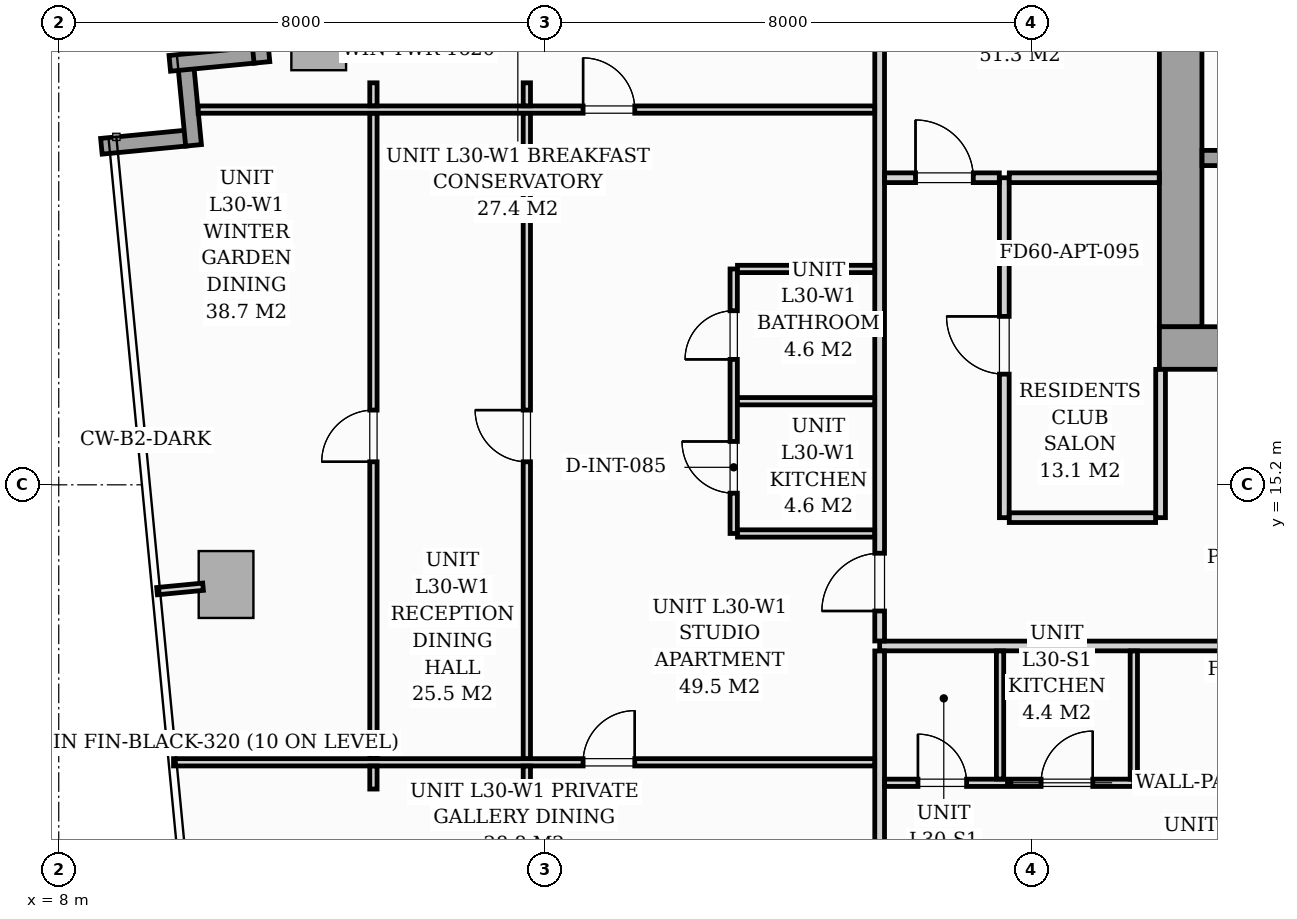
"""IFC4 building model, lengths in metres.
Left out: names, types, materials, properties, quantities, classifications, styles, units other than length and angle.
Written with IfcOpenShell. Run it as: python <this file> out.ifc"""

import sys

from ifc_helpers import new_model, si_unit, direction, frame, frame_2d, origin, origin_2d, place, context, subcontext, project, spatial, rectangle, i_section, extrude, source, transform, mapped, element, fill, save


model = new_model("IFC4")
c1 = context("Model", 3, precision=1e-05, world=origin(), true_north=direction((0.0, 1.0)))
c2 = subcontext(c1, "Body", "Model", "MODEL_VIEW")
j1 = project(units=[si_unit("LENGTHUNIT", "METRE"), si_unit("PLANEANGLEUNIT", "RADIAN")], contexts=[c1])
p1 = place(None, origin())
s1 = spatial("IfcSite", under=j1, at=p1, CompositionType="ELEMENT")
p2 = place(p1, origin())
s2 = spatial("IfcBuilding", under=s1, at=p2, CompositionType="ELEMENT")
p3 = place(p2, frame((0.0, 0.0, 106.6)))
s3 = spatial("IfcBuildingStorey", under=s2, at=p3, CompositionType="ELEMENT", Elevation=106.6)
m1 = source(origin(), c2, "Body", "SweptSolid", [
    extrude(i_section(OverallWidth=0.427, OverallDepth=0.483, WebThickness=0.051, FlangeThickness=0.082, FilletRadius=0.018, at=origin_2d()), origin(), (0.0, 0.0, 1.0), 3.196),
])
p4 = place(p3, frame((26.4, 17.4, 0.002), z_axis=(0.0, 0.0, 1.0), x_axis=(1.0, 0.0, 0.0)))
e1 = element("IfcColumn", 1, at=p4, inside=s3, PredefinedType="PILASTER", context=c2, shape_type="MappedRepresentation", body=[
    mapped(m1, transform((0.0, 0.0, 0.0), scale=1.0)),
])
m2 = source(origin(), c2, "Body", "SweptSolid", [
    extrude(rectangle(XDim=0.9, YDim=1.1, at=origin_2d()), origin(), (0.0, 0.0, 1.0), 3.196),
])
for number, where, z_axis, x_axis in (
    (2, (12.275, 22.568, 0.002), (0.0, 0.0, 1.0), (0.995, 0.096, 0.0)),
    (3, (10.752, 13.561, 0.002), (0.0, 0.0, 1.0), (0.995, 0.096, 0.0)),
):
    element("IfcColumn", number, at=place(p3, frame(where, z_axis=z_axis, x_axis=x_axis)), inside=s3, PredefinedType="COLUMN", context=c2, shape_type="MappedRepresentation", body=[
        mapped(m2, transform((0.0, 0.0, 0.0), scale=1.0)),
    ])
for number, where, z_axis, x_axis in (
    (4, (8.701, 20.767, 0.0), (0.0, 0.0, 1.0), (0.995, 0.096, 0.0)),
    (5, (10.217, 20.783, 0.0), (0.0, 0.0, 1.0), (-0.096, 0.995, 0.0)),
):
    element("IfcWall", number, at=place(p3, frame(where, z_axis=z_axis, x_axis=x_axis)), inside=s3, PredefinedType="STANDARD", context=c2, shape_type="SweptSolid", body=[
        extrude(rectangle(XDim=1.395, YDim=0.26, at=frame_2d((0.698, 0.0))), origin(), (0.0, 0.0, 1.0), 2.94),
    ])
p5 = place(p3, frame((9.826, 22.131, 0.0), z_axis=(0.0, 0.0, 1.0), x_axis=(0.995389446633, 0.095915846097, 0.0)))
e6 = element("IfcWall", 6, at=p5, inside=s3, PredefinedType="STANDARD", context=c2, shape_type="SweptSolid", body=[
    extrude(rectangle(XDim=1.395, YDim=0.26, at=frame_2d((0.697, 0.0))), origin(), (0.0, 0.0, 1.0), 2.94),
])
p6 = place(p3, frame((11.341, 22.147, 0.0), z_axis=(0.0, 0.0, 1.0), x_axis=(-0.09589913835, 0.995391056452, 0.0)))
e7 = element("IfcWall", 7, at=p6, inside=s3, PredefinedType="STANDARD", context=c2, shape_type="SweptSolid", body=[
    extrude(rectangle(XDim=1.395, YDim=0.26, at=frame_2d((0.698, 0.0))), origin(), (0.0, 0.0, 1.0), 2.94),
])
p7 = place(p3, frame((26.1, 17.45, 0.0), z_axis=(0.0, 0.0, 1.0), x_axis=(1.0, 0.0, 0.0)))
e8 = element("IfcWall", 8, at=p7, inside=s3, PredefinedType="SHEAR", context=c2, shape_type="SweptSolid", body=[
    extrude(rectangle(XDim=19.8, YDim=0.7, at=frame_2d((9.9, 0.0))), origin(), (0.0, 0.0, 1.0), 3.2),
])
p8 = place(p7, frame((1.05, 0.0, 0.0)))
e9 = element("IfcOpeningElement", 9, at=p8, cuts=e8, PredefinedType="OPENING", context=c2, shape_type="SweptSolid", body=[
    extrude(rectangle(XDim=0.95, YDim=2.06, at=frame_2d((0.475, 1.03))), frame((0.0, 0.36, 0.0), z_axis=(0.0, -1.0, 0.0), x_axis=(1.0, 0.0, 0.0)), (0.0, 0.0, 1.0), 0.72),
])
p9 = place(p7, frame((9.48, 0.0, 0.0)))
e10 = element("IfcOpeningElement", 10, at=p9, cuts=e8, PredefinedType="OPENING", context=c2, shape_type="SweptSolid", body=[
    extrude(rectangle(XDim=0.85, YDim=2.0, at=frame_2d((0.425, 1.0))), frame((0.0, 0.36, 0.0), z_axis=(0.0, -1.0, 0.0), x_axis=(1.0, 0.0, 0.0)), (0.0, 0.0, 1.0), 0.72),
])
p10 = place(p7, frame((17.65, 0.0, 0.0)))
e11 = element("IfcOpeningElement", 11, at=p10, cuts=e8, PredefinedType="OPENING", context=c2, shape_type="SweptSolid", body=[
    extrude(rectangle(XDim=0.95, YDim=2.06, at=frame_2d((0.475, 1.03))), frame((0.0, 0.36, 0.0), z_axis=(0.0, -1.0, 0.0), x_axis=(1.0, 0.0, 0.0)), (0.0, 0.0, 1.0), 0.72),
])
p11 = place(p3, frame((26.45, 17.802, 0.0), z_axis=(0.0, 0.0, 1.0), x_axis=(0.0, 1.0, 0.0)))
e12 = element("IfcWall", 12, at=p11, inside=s3, PredefinedType="SHEAR", context=c2, shape_type="SweptSolid", body=[
    extrude(rectangle(XDim=5.796, YDim=0.7, at=frame_2d((2.898, 0.0))), origin(), (0.0, 0.0, 1.0), 3.2),
])
p12 = place(p3, frame((26.802, 20.575, 0.0), z_axis=(0.0, 0.0, 1.0), x_axis=(1.0, 0.0, 0.0)))
e13 = element("IfcWall", 13, at=p12, inside=s3, PredefinedType="SOLIDWALL", context=c2, shape_type="SweptSolid", body=[
    extrude(rectangle(XDim=8.148, YDim=0.25, at=frame_2d((4.074, 0.0))), origin(), (0.0, 0.0, 1.0), 3.2),
])
p13 = place(p12, frame((0.348, 0.0, 0.0)))
e14 = element("IfcOpeningElement", 14, at=p13, cuts=e13, PredefinedType="OPENING", context=c2, shape_type="SweptSolid", body=[
    extrude(rectangle(XDim=0.95, YDim=2.06, at=frame_2d((0.475, 1.03))), frame((0.0, 0.135, 0.0), z_axis=(0.0, -1.0, 0.0), x_axis=(1.0, 0.0, 0.0)), (0.0, 0.0, 1.0), 0.27),
])
p14 = place(p3, frame((21.5, 12.55, 0.0), z_axis=(0.0, 0.0, 1.0), x_axis=(1.0, 0.0, 0.0)))
e15 = element("IfcWall", 15, at=p14, inside=s3, PredefinedType="PARTITIONING", context=c2, shape_type="SweptSolid", body=[
    extrude(rectangle(XDim=24.38, YDim=0.16, at=frame_2d((12.19, 0.0))), origin(), (0.0, 0.0, 1.0), 2.94),
])
p15 = place(p14, frame((6.075, 0.0, 0.0)))
e16 = element("IfcOpeningElement", 16, at=p15, cuts=e15, PredefinedType="OPENING", context=c2, shape_type="SweptSolid", body=[
    extrude(rectangle(XDim=0.95, YDim=2.06, at=frame_2d((0.475, 1.03))), frame((0.0, 0.09, 0.0), z_axis=(0.0, -1.0, 0.0), x_axis=(1.0, 0.0, 0.0)), (0.0, 0.0, 1.0), 0.18),
])
p16 = place(p14, frame((10.519, 0.0, 0.0)))
e17 = element("IfcOpeningElement", 17, at=p16, cuts=e15, PredefinedType="OPENING", context=c2, shape_type="SweptSolid", body=[
    extrude(rectangle(XDim=0.95, YDim=2.06, at=frame_2d((0.475, 1.03))), frame((0.0, 0.09, 0.0), z_axis=(0.0, -1.0, 0.0), x_axis=(1.0, 0.0, 0.0)), (0.0, 0.0, 1.0), 0.18),
])
p17 = place(p14, frame((18.208, 0.0, 0.0)))
e18 = element("IfcOpeningElement", 18, at=p17, cuts=e15, PredefinedType="OPENING", context=c2, shape_type="SweptSolid", body=[
    extrude(rectangle(XDim=0.95, YDim=2.06, at=frame_2d((0.475, 1.03))), frame((0.0, 0.09, 0.0), z_axis=(0.0, -1.0, 0.0), x_axis=(1.0, 0.0, 0.0)), (0.0, 0.0, 1.0), 0.18),
])
p18 = place(p3, frame((21.5, 4.812, 0.0), z_axis=(0.0, 0.0, 1.0), x_axis=(0.0, 1.0, 0.0)))
e19 = element("IfcWall", 19, at=p18, inside=s3, PredefinedType="PARTITIONING", context=c2, shape_type="SweptSolid", body=[
    extrude(rectangle(XDim=7.656, YDim=0.16, at=frame_2d((3.828, 0.0))), origin(), (0.0, 0.0, 1.0), 2.94),
])
p19 = place(p3, frame((21.5, 12.632, 0.0), z_axis=(0.0, 0.0, 1.0), x_axis=(0.0, 1.0, 0.0)))
e20 = element("IfcWall", 20, at=p19, inside=s3, PredefinedType="PARTITIONING", context=c2, shape_type="SweptSolid", body=[
    extrude(rectangle(XDim=11.747, YDim=0.16, at=frame_2d((5.873, 0.0))), origin(), (0.0, 0.0, 1.0), 2.94),
])
p20 = place(p19, frame((0.493, 0.0, 0.0)))
e21 = element("IfcOpeningElement", 21, at=p20, cuts=e20, PredefinedType="OPENING", context=c2, shape_type="SweptSolid", body=[
    extrude(rectangle(XDim=0.95, YDim=2.06, at=frame_2d((0.475, 1.03))), frame((0.0, 0.09, 0.0), z_axis=(0.0, -1.0, 0.0), x_axis=(1.0, 0.0, 0.0)), (0.0, 0.0, 1.0), 0.18),
])
p21 = place(p3, frame((21.582, 10.3, 0.0), z_axis=(0.0, 0.0, 1.0), x_axis=(1.0, 0.0, 0.0)))
e22 = element("IfcWall", 22, at=p21, inside=s3, PredefinedType="PARTITIONING", context=c2, shape_type="SweptSolid", body=[
    extrude(rectangle(XDim=4.098, YDim=0.12, at=frame_2d((2.049, 0.0))), origin(), (0.0, 0.0, 1.0), 2.94),
])
p22 = place(p21, frame((0.548, 0.0, 0.0)))
e23 = element("IfcOpeningElement", 23, at=p22, cuts=e22, PredefinedType="OPENING", context=c2, shape_type="SweptSolid", body=[
    extrude(rectangle(XDim=0.8, YDim=2.02, at=frame_2d((0.4, 1.01))), frame((0.0, 0.07, 0.0), z_axis=(0.0, -1.0, 0.0), x_axis=(1.0, 0.0, 0.0)), (0.0, 0.0, 1.0), 0.14),
])
p23 = place(p21, frame((2.573, 0.0, 0.0)))
e24 = element("IfcOpeningElement", 24, at=p23, cuts=e22, PredefinedType="OPENING", context=c2, shape_type="SweptSolid", body=[
    extrude(rectangle(XDim=0.85, YDim=2.05, at=frame_2d((0.425, 1.025))), frame((0.0, 0.07, 0.0), z_axis=(0.0, -1.0, 0.0), x_axis=(1.0, 0.0, 0.0)), (0.0, 0.0, 1.0), 0.14),
])
for number, where, z_axis, x_axis in (
    (25, (25.68, 10.362, 0.0), (0.0, 0.0, 1.0), (0.0, 1.0, 0.0)),
    (26, (23.48, 10.362, 0.0), (0.0, 0.0, 1.0), (0.0, 1.0, 0.0)),
):
    element("IfcWall", number, at=place(p3, frame(where, z_axis=z_axis, x_axis=x_axis)), inside=s3, PredefinedType="PARTITIONING", context=c2, shape_type="SweptSolid", body=[
        extrude(rectangle(XDim=2.106, YDim=0.12, at=frame_2d((1.053, 0.0))), origin(), (0.0, 0.0, 1.0), 2.94),
    ])
p24 = place(p3, frame((19.1, 14.4, 0.0), z_axis=(0.0, 0.0, 1.0), x_axis=(0.0, 1.0, 0.0)))
e27 = element("IfcWall", 27, at=p24, inside=s3, PredefinedType="PARTITIONING", context=c2, shape_type="SweptSolid", body=[
    extrude(rectangle(XDim=4.35, YDim=0.12, at=frame_2d((2.175, 0.0))), origin(), (0.0, 0.0, 1.0), 2.94),
])
p25 = place(p24, frame((0.663, 0.0, 0.0)))
e28 = element("IfcOpeningElement", 28, at=p25, cuts=e27, PredefinedType="OPENING", context=c2, shape_type="SweptSolid", body=[
    extrude(rectangle(XDim=0.85, YDim=2.05, at=frame_2d((0.425, 1.025))), frame((0.0, 0.07, 0.0), z_axis=(0.0, -1.0, 0.0), x_axis=(1.0, 0.0, 0.0)), (0.0, 0.0, 1.0), 0.14),
])
p26 = place(p24, frame((2.863, 0.0, 0.0)))
e29 = element("IfcOpeningElement", 29, at=p26, cuts=e27, PredefinedType="OPENING", context=c2, shape_type="SweptSolid", body=[
    extrude(rectangle(XDim=0.8, YDim=2.02, at=frame_2d((0.4, 1.01))), frame((0.0, 0.07, 0.0), z_axis=(0.0, -1.0, 0.0), x_axis=(1.0, 0.0, 0.0)), (0.0, 0.0, 1.0), 0.14),
])
for number, where, z_axis, x_axis in (
    (30, (19.162, 16.575, 0.0), (0.0, 0.0, 1.0), (1.0, 0.0, 0.0)),
    (31, (19.162, 14.4, 0.0), (0.0, 0.0, 1.0), (1.0, 0.0, 0.0)),
    (32, (19.162, 18.75, 0.0), (0.0, 0.0, 1.0), (1.0, 0.0, 0.0)),
):
    element("IfcWall", number, at=place(p3, frame(where, z_axis=z_axis, x_axis=x_axis)), inside=s3, PredefinedType="PARTITIONING", context=c2, shape_type="SweptSolid", body=[
        extrude(rectangle(XDim=2.256, YDim=0.12, at=frame_2d((1.128, 0.0))), origin(), (0.0, 0.0, 1.0), 2.94),
    ])
p27 = place(p3, frame((10.293, 21.371, 0.0), z_axis=(0.0, 0.0, 1.0), x_axis=(1.0, 0.0, 0.0)))
e33 = element("IfcWall", 33, at=p27, inside=s3, PredefinedType="PARTITIONING", context=c2, shape_type="SweptSolid", body=[
    extrude(rectangle(XDim=11.125, YDim=0.12, at=frame_2d((5.562, 0.0))), origin(), (0.0, 0.0, 1.0), 2.94),
])
p28 = place(p27, frame((6.33, 0.0, 0.0)))
e34 = element("IfcOpeningElement", 34, at=p28, cuts=e33, PredefinedType="OPENING", context=c2, shape_type="SweptSolid", body=[
    extrude(rectangle(XDim=0.85, YDim=2.05, at=frame_2d((0.425, 1.025))), frame((0.0, 0.07, 0.0), z_axis=(0.0, -1.0, 0.0), x_axis=(1.0, 0.0, 0.0)), (0.0, 0.0, 1.0), 0.14),
])
p29 = place(p3, frame((9.888, 10.637, 0.0), z_axis=(0.0, 0.0, 1.0), x_axis=(1.0, 0.0, 0.0)))
e35 = element("IfcWall", 35, at=p29, inside=s3, PredefinedType="PARTITIONING", context=c2, shape_type="SweptSolid", body=[
    extrude(rectangle(XDim=11.53, YDim=0.12, at=frame_2d((5.765, 0.0))), origin(), (0.0, 0.0, 1.0), 2.94),
])
p30 = place(p29, frame((6.735, 0.0, 0.0)))
e36 = element("IfcOpeningElement", 36, at=p30, cuts=e35, PredefinedType="OPENING", context=c2, shape_type="SweptSolid", body=[
    extrude(rectangle(XDim=0.85, YDim=2.05, at=frame_2d((0.425, 1.025))), frame((0.0, 0.07, 0.0), z_axis=(0.0, -1.0, 0.0), x_axis=(1.0, 0.0, 0.0)), (0.0, 0.0, 1.0), 0.14),
])
p31 = place(p3, frame((13.175, 10.197, 0.0), z_axis=(0.0, 0.0, 1.0), x_axis=(0.0, 1.0, 0.0)))
e37 = element("IfcWall", 37, at=p31, inside=s3, PredefinedType="PARTITIONING", context=c2, shape_type="SweptSolid", body=[
    extrude(rectangle(XDim=0.378, YDim=0.12, at=frame_2d((0.189, 0.0))), origin(), (0.0, 0.0, 1.0), 2.94),
])
p32 = place(p3, frame((13.175, 10.699, 0.0), z_axis=(0.0, 0.0, 1.0), x_axis=(0.0, 1.0, 0.0)))
e38 = element("IfcWall", 38, at=p32, inside=s3, PredefinedType="PARTITIONING", context=c2, shape_type="SweptSolid", body=[
    extrude(rectangle(XDim=10.61, YDim=0.12, at=frame_2d((5.305, 0.0))), origin(), (0.0, 0.0, 1.0), 2.94),
])
p33 = place(p32, frame((4.88, 0.0, 0.0)))
e39 = element("IfcOpeningElement", 39, at=p33, cuts=e38, PredefinedType="OPENING", context=c2, shape_type="SweptSolid", body=[
    extrude(rectangle(XDim=0.85, YDim=2.05, at=frame_2d((0.425, 1.025))), frame((0.0, 0.07, 0.0), z_axis=(0.0, -1.0, 0.0), x_axis=(1.0, 0.0, 0.0)), (0.0, 0.0, 1.0), 0.14),
])
for number, where, z_axis, x_axis in (
    (40, (13.175, 21.433, 0.0), (0.0, 0.0, 1.0), (0.0, 1.0, 0.0)),
    (41, (15.698, 10.197, 0.0), (0.0, 0.0, 1.0), (0.0, 1.0, 0.0)),
):
    element("IfcWall", number, at=place(p3, frame(where, z_axis=z_axis, x_axis=x_axis)), inside=s3, PredefinedType="PARTITIONING", context=c2, shape_type="SweptSolid", body=[
        extrude(rectangle(XDim=0.378, YDim=0.12, at=frame_2d((0.189, 0.0))), origin(), (0.0, 0.0, 1.0), 2.94),
    ])
p34 = place(p3, frame((15.698, 10.699, 0.0), z_axis=(0.0, 0.0, 1.0), x_axis=(0.0, 1.0, 0.0)))
e42 = element("IfcWall", 42, at=p34, inside=s3, PredefinedType="PARTITIONING", context=c2, shape_type="SweptSolid", body=[
    extrude(rectangle(XDim=10.61, YDim=0.12, at=frame_2d((5.305, 0.0))), origin(), (0.0, 0.0, 1.0), 2.94),
])
p35 = place(p34, frame((4.88, 0.0, 0.0)))
e43 = element("IfcOpeningElement", 43, at=p35, cuts=e42, PredefinedType="OPENING", context=c2, shape_type="SweptSolid", body=[
    extrude(rectangle(XDim=0.85, YDim=2.05, at=frame_2d((0.425, 1.025))), frame((0.0, 0.07, 0.0), z_axis=(0.0, -1.0, 0.0), x_axis=(1.0, 0.0, 0.0)), (0.0, 0.0, 1.0), 0.14),
])
p36 = place(p3, frame((15.698, 21.433, 0.0), z_axis=(0.0, 0.0, 1.0), x_axis=(0.0, 1.0, 0.0)))
e44 = element("IfcWall", 44, at=p36, inside=s3, PredefinedType="PARTITIONING", context=c2, shape_type="SweptSolid", body=[
    extrude(rectangle(XDim=0.378, YDim=0.12, at=frame_2d((0.189, 0.0))), origin(), (0.0, 0.0, 1.0), 2.94),
])
p37 = place(p3, frame((23.55, 14.66, 0.0), z_axis=(0.0, 0.0, 1.0), x_axis=(0.0, 1.0, 0.0)))
e45 = element("IfcWall", 45, at=p37, inside=s3, PredefinedType="PARTITIONING", context=c2, shape_type="SweptSolid", body=[
    extrude(rectangle(XDim=5.59, YDim=0.16, at=frame_2d((2.795, 0.0))), origin(), (0.0, 0.0, 1.0), 2.94),
])
p38 = place(p37, frame((2.36, 0.0, 0.0)))
e46 = element("IfcOpeningElement", 46, at=p38, cuts=e45, PredefinedType="OPENING", context=c2, shape_type="SweptSolid", body=[
    extrude(rectangle(XDim=0.95, YDim=2.06, at=frame_2d((0.475, 1.03))), frame((0.0, 0.09, 0.0), z_axis=(0.0, -1.0, 0.0), x_axis=(1.0, 0.0, 0.0)), (0.0, 0.0, 1.0), 0.18),
])
p39 = place(p3, frame((21.582, 20.25, 0.0), z_axis=(0.0, 0.0, 1.0), x_axis=(1.0, 0.0, 0.0)))
e47 = element("IfcWall", 47, at=p39, inside=s3, PredefinedType="PARTITIONING", context=c2, shape_type="SweptSolid", body=[
    extrude(rectangle(XDim=1.886, YDim=0.16, at=frame_2d((0.943, 0.0))), origin(), (0.0, 0.0, 1.0), 2.94),
])
p40 = place(p39, frame((0.508, 0.0, 0.0)))
e48 = element("IfcOpeningElement", 48, at=p40, cuts=e47, PredefinedType="OPENING", context=c2, shape_type="SweptSolid", body=[
    extrude(rectangle(XDim=0.95, YDim=2.06, at=frame_2d((0.475, 1.03))), frame((0.0, 0.09, 0.0), z_axis=(0.0, -1.0, 0.0), x_axis=(1.0, 0.0, 0.0)), (0.0, 0.0, 1.0), 0.18),
])
p41 = place(p3, frame((23.632, 20.25, 0.0), z_axis=(0.0, 0.0, 1.0), x_axis=(1.0, 0.0, 0.0)))
e49 = element("IfcWall", 49, at=p41, inside=s3, PredefinedType="PARTITIONING", context=c2, shape_type="SweptSolid", body=[
    extrude(rectangle(XDim=2.466, YDim=0.16, at=frame_2d((1.233, 0.0))), origin(), (0.0, 0.0, 1.0), 2.94),
])
p42 = place(p3, frame((26.12, 14.66, 0.0), z_axis=(0.0, 0.0, 1.0), x_axis=(0.0, 1.0, 0.0)))
e50 = element("IfcWall", 50, at=p42, inside=s3, PredefinedType="PARTITIONING", context=c2, shape_type="SweptSolid", body=[
    extrude(rectangle(XDim=2.438, YDim=0.16, at=frame_2d((1.219, 0.0))), origin(), (0.0, 0.0, 1.0), 2.94),
])
p43 = place(p3, frame((23.632, 14.66, 0.0), z_axis=(0.0, 0.0, 1.0), x_axis=(1.0, 0.0, 0.0)))
e51 = element("IfcWall", 51, at=p43, inside=s3, PredefinedType="PARTITIONING", context=c2, shape_type="SweptSolid", body=[
    extrude(rectangle(XDim=2.406, YDim=0.16, at=frame_2d((1.203, 0.0))), origin(), (0.0, 0.0, 1.0), 2.94),
])
p44 = place(p3, frame((10.373, 13.524, 0.0), z_axis=(0.0, 0.0, 1.0), x_axis=(-0.995377786728, -0.096036772582, 0.0)))
e52 = element("IfcWall", 52, at=p44, inside=s3, PredefinedType="PARTITIONING", context=c2, shape_type="SweptSolid", body=[
    extrude(rectangle(XDim=0.76, YDim=0.12, at=frame_2d((0.38, 0.0))), origin(), (0.0, 0.0, 1.0), 2.94),
])
m3 = source(origin(), c2, "Body", "SweptSolid", [
    extrude(rectangle(XDim=0.8, YDim=2.02, at=frame_2d((0.4, 1.01))), frame((0.0, 0.025, 0.0), z_axis=(0.0, -1.0, 0.0), x_axis=(1.0, 0.0, 0.0)), (0.0, 0.0, 1.0), 0.05),
])
p45 = place(p22, origin())
e53 = element("IfcDoor", 53, at=p45, inside=s3, OperationType="SINGLE_SWING_LEFT", PredefinedType="DOOR", context=c2, shape_type="MappedRepresentation", body=[
    mapped(m3, transform((0.0, 0.0, 0.0), scale=1.0)),
])
fill(e23, e53)
m4 = source(origin(), c2, "Body", "SweptSolid", [
    extrude(rectangle(XDim=0.85, YDim=2.05, at=frame_2d((0.425, 1.025))), frame((0.0, 0.025, 0.0), z_axis=(0.0, -1.0, 0.0), x_axis=(1.0, 0.0, 0.0)), (0.0, 0.0, 1.0), 0.05),
])
p46 = place(p23, origin())
e54 = element("IfcDoor", 54, at=p46, inside=s3, OperationType="SINGLE_SWING_RIGHT", PredefinedType="DOOR", context=c2, shape_type="MappedRepresentation", body=[
    mapped(m4, transform((0.0, 0.0, 0.0), scale=1.0)),
])
fill(e24, e54)
m5 = source(origin(), c2, "Body", "SweptSolid", [
    extrude(rectangle(XDim=0.95, YDim=2.06, at=frame_2d((0.475, 1.03))), frame((0.0, 0.025, 0.0), z_axis=(0.0, -1.0, 0.0), x_axis=(1.0, 0.0, 0.0)), (0.0, 0.0, 1.0), 0.05),
])
p47 = place(p20, origin())
e55 = element("IfcDoor", 55, at=p47, inside=s3, OperationType="SINGLE_SWING_LEFT", PredefinedType="DOOR", context=c2, shape_type="MappedRepresentation", body=[
    mapped(m5, transform((0.0, 0.0, 0.0), scale=1.0)),
])
fill(e21, e55)
p48 = place(p25, origin())
e56 = element("IfcDoor", 56, at=p48, inside=s3, OperationType="SINGLE_SWING_RIGHT", PredefinedType="DOOR", context=c2, shape_type="MappedRepresentation", body=[
    mapped(m4, transform((0.0, 0.0, 0.0), scale=1.0)),
])
fill(e28, e56)
p49 = place(p26, origin())
e57 = element("IfcDoor", 57, at=p49, inside=s3, OperationType="SINGLE_SWING_LEFT", PredefinedType="DOOR", context=c2, shape_type="MappedRepresentation", body=[
    mapped(m3, transform((0.0, 0.0, 0.0), scale=1.0)),
])
fill(e29, e57)
p50 = place(p28, origin())
e58 = element("IfcDoor", 58, at=p50, inside=s3, OperationType="SINGLE_SWING_LEFT", PredefinedType="DOOR", context=c2, shape_type="MappedRepresentation", body=[
    mapped(m4, transform((0.0, 0.0, 0.0), scale=1.0)),
])
fill(e34, e58)
p51 = place(p30, origin())
e59 = element("IfcDoor", 59, at=p51, inside=s3, OperationType="SINGLE_SWING_RIGHT", PredefinedType="DOOR", context=c2, shape_type="MappedRepresentation", body=[
    mapped(m4, transform((0.0, 0.0, 0.0), scale=1.0)),
])
fill(e36, e59)
p52 = place(p33, origin())
e60 = element("IfcDoor", 60, at=p52, inside=s3, OperationType="SINGLE_SWING_LEFT", PredefinedType="DOOR", context=c2, shape_type="MappedRepresentation", body=[
    mapped(m4, transform((0.0, 0.0, 0.0), scale=1.0)),
])
fill(e39, e60)
p53 = place(p35, origin())
e61 = element("IfcDoor", 61, at=p53, inside=s3, OperationType="SINGLE_SWING_RIGHT", PredefinedType="DOOR", context=c2, shape_type="MappedRepresentation", body=[
    mapped(m4, transform((0.0, 0.0, 0.0), scale=1.0)),
])
fill(e43, e61)
p54 = place(p38, origin())
e62 = element("IfcDoor", 62, at=p54, inside=s3, OperationType="SINGLE_SWING_RIGHT", PredefinedType="DOOR", context=c2, shape_type="MappedRepresentation", body=[
    mapped(m5, transform((0.0, 0.0, 0.0), scale=1.0)),
])
fill(e46, e62)
p55 = place(p40, origin())
e63 = element("IfcDoor", 63, at=p55, inside=s3, OperationType="SINGLE_SWING_LEFT", PredefinedType="DOOR", context=c2, shape_type="MappedRepresentation", body=[
    mapped(m5, transform((0.0, 0.0, 0.0), scale=1.0)),
])
fill(e48, e63)
save(model, sys.argv[1])
